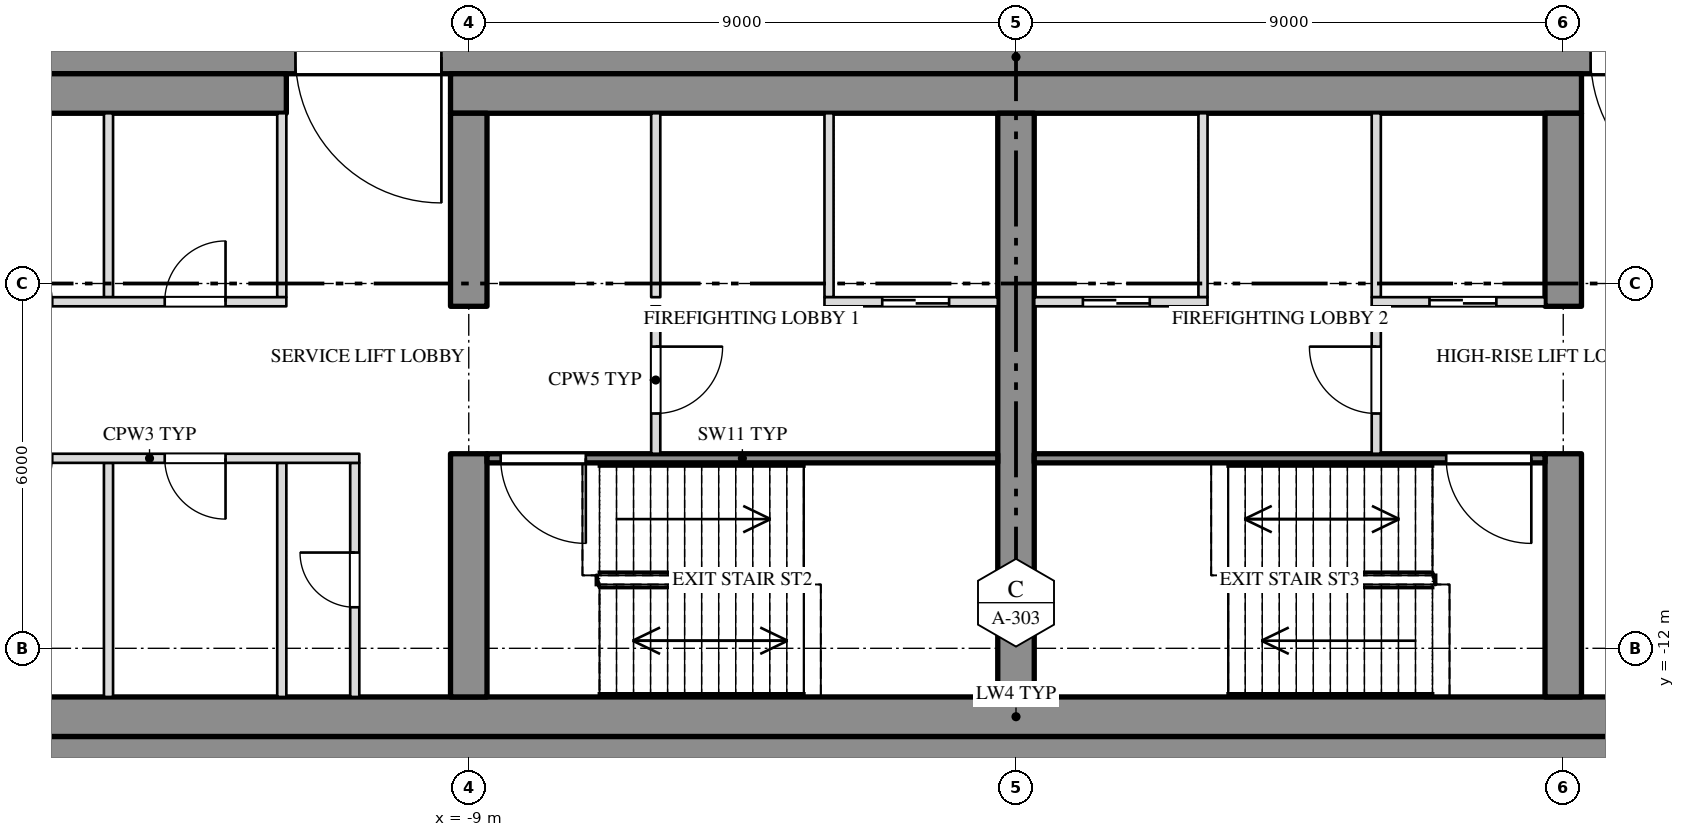
"""IFC4 building model, lengths in metres.
Left out: names, types, materials, properties, quantities, classifications, styles, units other than length and angle.
Written with IfcOpenShell. Run it as: python <this file> out.ifc"""

import sys

from ifc_helpers import new_model, si_unit, direction, frame, frame_2d, origin, place, context, subcontext, project, spatial, rectangle, extrude, element, fill, save


model = new_model("IFC4")
c1 = context("Model", 3, precision=1e-05, world=origin(), true_north=direction((0.0, 1.0)))
c2 = subcontext(c1, "Body", "Model", "MODEL_VIEW")
j1 = project(units=[si_unit("LENGTHUNIT", "METRE"), si_unit("PLANEANGLEUNIT", "RADIAN")], contexts=[c1])
p1 = place(None, origin())
s1 = spatial("IfcSite", under=j1, at=p1, CompositionType="ELEMENT")
p2 = place(p1, origin())
s2 = spatial("IfcBuilding", under=s1, at=p2, CompositionType="ELEMENT")
p3 = place(p2, frame((0.0, 0.0, 276.5)))
s3 = spatial("IfcBuildingStorey", under=s2, at=p3, CompositionType="ELEMENT", Elevation=276.5)
p4 = place(p3, frame((-27.0, -2.275, 0.0), z_axis=(0.0, 0.0, 1.0), x_axis=(1.0, 0.0, 0.0)))
e1 = element("IfcWall", 1, at=p4, inside=s3, PredefinedType="SHEAR", context=c2, shape_type="SweptSolid", body=[
    extrude(rectangle(XDim=54.0, YDim=0.55, at=frame_2d((27.0, 0.0))), origin(), (0.0, 0.0, 1.0), 3.78),
])
p5 = place(p4, frame((15.15, 0.0, 0.0)))
e2 = element("IfcOpeningElement", 2, at=p5, cuts=e1, PredefinedType="OPENING", context=c2, shape_type="SweptSolid", body=[
    extrude(rectangle(XDim=2.4, YDim=2.1, at=frame_2d((1.2, 1.05))), frame((0.0, 0.287, 0.0), z_axis=(0.0, -1.0, 0.0), x_axis=(1.0, 0.0, 0.0)), (0.0, 0.0, 1.0), 0.574),
])
p6 = place(p4, frame((36.45, 0.0, 0.0)))
e3 = element("IfcOpeningElement", 3, at=p6, cuts=e1, PredefinedType="OPENING", context=c2, shape_type="SweptSolid", body=[
    extrude(rectangle(XDim=2.4, YDim=2.1, at=frame_2d((1.2, 1.05))), frame((0.0, 0.287, 0.0), z_axis=(0.0, -1.0, 0.0), x_axis=(1.0, 0.0, 0.0)), (0.0, 0.0, 1.0), 0.574),
])
p7 = place(p3, frame((-27.0, -13.725, 0.0), z_axis=(0.0, 0.0, 1.0), x_axis=(1.0, 0.0, 0.0)))
e4 = element("IfcWall", 4, at=p7, inside=s3, PredefinedType="SHEAR", context=c2, shape_type="SweptSolid", body=[
    extrude(rectangle(XDim=54.0, YDim=0.55, at=frame_2d((27.0, 0.0))), origin(), (0.0, 0.0, 1.0), 3.78),
])
p8 = place(p3, frame((-26.45, -2.875, 0.0), z_axis=(0.0, 0.0, 1.0), x_axis=(1.0, 0.0, 0.0)))
e5 = element("IfcWall", 5, at=p8, inside=s3, PredefinedType="SHEAR", context=c2, shape_type="SweptSolid", body=[
    extrude(rectangle(XDim=14.45, YDim=0.65, at=frame_2d((7.225, 0.0))), origin(), (0.0, 0.0, 1.0), 3.78),
])
p9 = place(p3, frame((-9.3, -2.875, 0.0), z_axis=(0.0, 0.0, 1.0), x_axis=(1.0, 0.0, 0.0)))
e6 = element("IfcWall", 6, at=p9, inside=s3, PredefinedType="SHEAR", context=c2, shape_type="SweptSolid", body=[
    extrude(rectangle(XDim=18.6, YDim=0.65, at=frame_2d((9.3, 0.0))), origin(), (0.0, 0.0, 1.0), 3.78),
])
p10 = place(p3, frame((-26.45, -13.125, 0.0), z_axis=(0.0, 0.0, 1.0), x_axis=(1.0, 0.0, 0.0)))
e7 = element("IfcWall", 7, at=p10, inside=s3, PredefinedType="SHEAR", context=c2, shape_type="SweptSolid", body=[
    extrude(rectangle(XDim=52.9, YDim=0.65, at=frame_2d((26.45, 0.0))), origin(), (0.0, 0.0, 1.0), 3.78),
])
p11 = place(p3, frame((-9.0, -12.8, 0.0), z_axis=(0.0, 0.0, 1.0), x_axis=(0.0, 1.0, 0.0)))
e8 = element("IfcWall", 8, at=p11, inside=s3, PredefinedType="SHEAR", context=c2, shape_type="SweptSolid", body=[
    extrude(rectangle(XDim=4.0, YDim=0.6, at=frame_2d((2.0, 0.0))), origin(), (0.0, 0.0, 1.0), 3.78),
])
p12 = place(p3, frame((-9.0, -6.375, 0.0), z_axis=(0.0, 0.0, 1.0), x_axis=(0.0, 1.0, 0.0)))
e9 = element("IfcWall", 9, at=p12, inside=s3, PredefinedType="SHEAR", context=c2, shape_type="SweptSolid", body=[
    extrude(rectangle(XDim=3.175, YDim=0.6, at=frame_2d((1.587, 0.0))), origin(), (0.0, 0.0, 1.0), 3.78),
])
p13 = place(p3, frame((0.0, -12.8, 0.0), z_axis=(0.0, 0.0, 1.0), x_axis=(0.0, 1.0, 0.0)))
e10 = element("IfcWall", 10, at=p13, inside=s3, PredefinedType="SHEAR", context=c2, shape_type="SweptSolid", body=[
    extrude(rectangle(XDim=9.6, YDim=0.6, at=frame_2d((4.8, 0.0))), origin(), (0.0, 0.0, 1.0), 3.78),
])
p14 = place(p3, frame((9.0, -12.8, 0.0), z_axis=(0.0, 0.0, 1.0), x_axis=(0.0, 1.0, 0.0)))
e11 = element("IfcWall", 11, at=p14, inside=s3, PredefinedType="SHEAR", context=c2, shape_type="SweptSolid", body=[
    extrude(rectangle(XDim=4.0, YDim=0.6, at=frame_2d((2.0, 0.0))), origin(), (0.0, 0.0, 1.0), 3.78),
])
p15 = place(p3, frame((9.0, -6.375, 0.0), z_axis=(0.0, 0.0, 1.0), x_axis=(0.0, 1.0, 0.0)))
e12 = element("IfcWall", 12, at=p15, inside=s3, PredefinedType="SHEAR", context=c2, shape_type="SweptSolid", body=[
    extrude(rectangle(XDim=3.175, YDim=0.6, at=frame_2d((1.587, 0.0))), origin(), (0.0, 0.0, 1.0), 3.78),
])
for number, where, z_axis, x_axis in (
    (13, (-12.075, -6.225, 0.0), (0.0, 0.0, 1.0), (0.0, 1.0, 0.0)),
    (14, (-14.925, -6.225, 0.0), (0.0, 0.0, 1.0), (0.0, 1.0, 0.0)),
    (15, (-3.075, -6.225, 0.0), (0.0, 0.0, 1.0), (0.0, 1.0, 0.0)),
    (16, (-5.925, -6.225, 0.0), (0.0, 0.0, 1.0), (0.0, 1.0, 0.0)),
    (17, (3.075, -6.225, 0.0), (0.0, 0.0, 1.0), (0.0, 1.0, 0.0)),
    (18, (5.925, -6.225, 0.0), (0.0, 0.0, 1.0), (0.0, 1.0, 0.0)),
):
    element("IfcWall", number, at=place(p3, frame(where, z_axis=z_axis, x_axis=x_axis)), inside=s3, PredefinedType="PARTITIONING", context=c2, shape_type="SweptSolid", body=[
        extrude(rectangle(XDim=3.025, YDim=0.15, at=frame_2d((1.513, 0.0))), origin(), (0.0, 0.0, 1.0), 3.78),
    ])
p16 = place(p3, frame((-10.875, -12.8, 0.0), z_axis=(0.0, 0.0, 1.0), x_axis=(0.0, 1.0, 0.0)))
e19 = element("IfcWall", 19, at=p16, inside=s3, PredefinedType="PARTITIONING", context=c2, shape_type="SweptSolid", body=[
    extrude(rectangle(XDim=3.85, YDim=0.15, at=frame_2d((1.925, 0.0))), origin(), (0.0, 0.0, 1.0), 3.78),
])
p17 = place(p16, frame((1.475, 0.0, 0.0)))
e20 = element("IfcOpeningElement", 20, at=p17, cuts=e19, PredefinedType="OPENING", context=c2, shape_type="SweptSolid", body=[
    extrude(rectangle(XDim=0.9, YDim=2.1, at=frame_2d((0.45, 1.05))), frame((0.0, 0.087, 0.0), z_axis=(0.0, -1.0, 0.0), x_axis=(1.0, 0.0, 0.0)), (0.0, 0.0, 1.0), 0.174),
])
for number, where, z_axis, x_axis in (
    (21, (-12.075, -12.8, 0.0), (0.0, 0.0, 1.0), (0.0, 1.0, 0.0)),
    (22, (-14.925, -12.8, 0.0), (0.0, 0.0, 1.0), (0.0, 1.0, 0.0)),
):
    element("IfcWall", number, at=place(p3, frame(where, z_axis=z_axis, x_axis=x_axis)), inside=s3, PredefinedType="PARTITIONING", context=c2, shape_type="SweptSolid", body=[
        extrude(rectangle(XDim=3.85, YDim=0.15, at=frame_2d((1.925, 0.0))), origin(), (0.0, 0.0, 1.0), 3.78),
    ])
p18 = place(p3, frame((-5.925, -8.8, 0.0), z_axis=(0.0, 0.0, 1.0), x_axis=(0.0, 1.0, 0.0)))
e23 = element("IfcWall", 23, at=p18, inside=s3, PredefinedType="PARTITIONING", context=c2, shape_type="SweptSolid", body=[
    extrude(rectangle(XDim=2.425, YDim=0.15, at=frame_2d((1.212, 0.0))), origin(), (0.0, 0.0, 1.0), 3.78),
])
p19 = place(p18, frame((0.662, 0.0, 0.0)))
e24 = element("IfcOpeningElement", 24, at=p19, cuts=e23, PredefinedType="OPENING", context=c2, shape_type="SweptSolid", body=[
    extrude(rectangle(XDim=1.1, YDim=2.1, at=frame_2d((0.55, 1.05))), frame((0.0, 0.087, 0.0), z_axis=(0.0, -1.0, 0.0), x_axis=(1.0, 0.0, 0.0)), (0.0, 0.0, 1.0), 0.174),
])
p20 = place(p3, frame((5.925, -8.8, 0.0), z_axis=(0.0, 0.0, 1.0), x_axis=(0.0, 1.0, 0.0)))
e25 = element("IfcWall", 25, at=p20, inside=s3, PredefinedType="PARTITIONING", context=c2, shape_type="SweptSolid", body=[
    extrude(rectangle(XDim=2.425, YDim=0.15, at=frame_2d((1.212, 0.0))), origin(), (0.0, 0.0, 1.0), 3.78),
])
p21 = place(p20, frame((0.662, 0.0, 0.0)))
e26 = element("IfcOpeningElement", 26, at=p21, cuts=e25, PredefinedType="OPENING", context=c2, shape_type="SweptSolid", body=[
    extrude(rectangle(XDim=1.1, YDim=2.1, at=frame_2d((0.55, 1.05))), frame((0.0, 0.087, 0.0), z_axis=(0.0, -1.0, 0.0), x_axis=(1.0, 0.0, 0.0)), (0.0, 0.0, 1.0), 0.174),
])
p22 = place(p3, frame((-17.7, -6.3, 0.0), z_axis=(0.0, 0.0, 1.0), x_axis=(1.0, 0.0, 0.0)))
e27 = element("IfcWall", 27, at=p22, inside=s3, PredefinedType="PARTITIONING", context=c2, shape_type="SweptSolid", body=[
    extrude(rectangle(XDim=5.7, YDim=0.15, at=frame_2d((2.85, 0.0))), origin(), (0.0, 0.0, 1.0), 3.78),
])
p23 = place(p22, frame((0.85, 0.0, 0.0)))
e28 = element("IfcOpeningElement", 28, at=p23, cuts=e27, PredefinedType="OPENING", context=c2, shape_type="SweptSolid", body=[
    extrude(rectangle(XDim=1.0, YDim=2.1, at=frame_2d((0.5, 1.05))), frame((0.0, 0.087, 0.0), z_axis=(0.0, -1.0, 0.0), x_axis=(1.0, 0.0, 0.0)), (0.0, 0.0, 1.0), 0.174),
])
p24 = place(p22, frame((3.7, 0.0, 0.0)))
e29 = element("IfcOpeningElement", 29, at=p24, cuts=e27, PredefinedType="OPENING", context=c2, shape_type="SweptSolid", body=[
    extrude(rectangle(XDim=1.0, YDim=2.1, at=frame_2d((0.5, 1.05))), frame((0.0, 0.087, 0.0), z_axis=(0.0, -1.0, 0.0), x_axis=(1.0, 0.0, 0.0)), (0.0, 0.0, 1.0), 0.174),
])
p25 = place(p3, frame((-3.15, -6.3, 0.0), z_axis=(0.0, 0.0, 1.0), x_axis=(1.0, 0.0, 0.0)))
e30 = element("IfcWall", 30, at=p25, inside=s3, PredefinedType="PARTITIONING", context=c2, shape_type="SweptSolid", body=[
    extrude(rectangle(XDim=2.85, YDim=0.15, at=frame_2d((1.425, 0.0))), origin(), (0.0, 0.0, 1.0), 3.78),
])
p26 = place(p25, frame((0.95, 0.0, 0.0)))
e31 = element("IfcOpeningElement", 31, at=p26, cuts=e30, PredefinedType="OPENING", context=c2, shape_type="SweptSolid", body=[
    extrude(rectangle(XDim=1.1, YDim=2.1, at=frame_2d((0.55, 1.05))), frame((0.0, 0.087, 0.0), z_axis=(0.0, -1.0, 0.0), x_axis=(1.0, 0.0, 0.0)), (0.0, 0.0, 1.0), 0.174),
])
p27 = place(p3, frame((0.3, -6.3, 0.0), z_axis=(0.0, 0.0, 1.0), x_axis=(1.0, 0.0, 0.0)))
e32 = element("IfcWall", 32, at=p27, inside=s3, PredefinedType="PARTITIONING", context=c2, shape_type="SweptSolid", body=[
    extrude(rectangle(XDim=2.85, YDim=0.15, at=frame_2d((1.425, 0.0))), origin(), (0.0, 0.0, 1.0), 3.78),
])
p28 = place(p27, frame((0.8, 0.0, 0.0)))
e33 = element("IfcOpeningElement", 33, at=p28, cuts=e32, PredefinedType="OPENING", context=c2, shape_type="SweptSolid", body=[
    extrude(rectangle(XDim=1.1, YDim=2.1, at=frame_2d((0.55, 1.05))), frame((0.0, 0.087, 0.0), z_axis=(0.0, -1.0, 0.0), x_axis=(1.0, 0.0, 0.0)), (0.0, 0.0, 1.0), 0.174),
])
p29 = place(p3, frame((5.85, -6.3, 0.0), z_axis=(0.0, 0.0, 1.0), x_axis=(1.0, 0.0, 0.0)))
e34 = element("IfcWall", 34, at=p29, inside=s3, PredefinedType="PARTITIONING", context=c2, shape_type="SweptSolid", body=[
    extrude(rectangle(XDim=2.85, YDim=0.15, at=frame_2d((1.425, 0.0))), origin(), (0.0, 0.0, 1.0), 3.78),
])
p30 = place(p29, frame((0.95, 0.0, 0.0)))
e35 = element("IfcOpeningElement", 35, at=p30, cuts=e34, PredefinedType="OPENING", context=c2, shape_type="SweptSolid", body=[
    extrude(rectangle(XDim=1.1, YDim=2.1, at=frame_2d((0.55, 1.05))), frame((0.0, 0.087, 0.0), z_axis=(0.0, -1.0, 0.0), x_axis=(1.0, 0.0, 0.0)), (0.0, 0.0, 1.0), 0.174),
])
p31 = place(p3, frame((-17.7, -8.875, 0.0), z_axis=(0.0, 0.0, 1.0), x_axis=(1.0, 0.0, 0.0)))
e36 = element("IfcWall", 36, at=p31, inside=s3, PredefinedType="PARTITIONING", context=c2, shape_type="SweptSolid", body=[
    extrude(rectangle(XDim=6.9, YDim=0.15, at=frame_2d((3.45, 0.0))), origin(), (0.0, 0.0, 1.0), 3.78),
])
p32 = place(p31, frame((0.85, 0.0, 0.0)))
e37 = element("IfcOpeningElement", 37, at=p32, cuts=e36, PredefinedType="OPENING", context=c2, shape_type="SweptSolid", body=[
    extrude(rectangle(XDim=1.0, YDim=2.1, at=frame_2d((0.5, 1.05))), frame((0.0, 0.087, 0.0), z_axis=(0.0, -1.0, 0.0), x_axis=(1.0, 0.0, 0.0)), (0.0, 0.0, 1.0), 0.174),
])
p33 = place(p31, frame((3.7, 0.0, 0.0)))
e38 = element("IfcOpeningElement", 38, at=p33, cuts=e36, PredefinedType="OPENING", context=c2, shape_type="SweptSolid", body=[
    extrude(rectangle(XDim=1.0, YDim=2.1, at=frame_2d((0.5, 1.05))), frame((0.0, 0.087, 0.0), z_axis=(0.0, -1.0, 0.0), x_axis=(1.0, 0.0, 0.0)), (0.0, 0.0, 1.0), 0.174),
])
p34 = place(p3, frame((-8.7, -8.875, 0.0), z_axis=(0.0, 0.0, 1.0), x_axis=(1.0, 0.0, 0.0)))
e39 = element("IfcWall", 39, at=p34, inside=s3, PredefinedType="SHEAR", context=c2, shape_type="SweptSolid", body=[
    extrude(rectangle(XDim=8.4, YDim=0.15, at=frame_2d((4.2, 0.0))), origin(), (0.0, 0.0, 1.0), 3.78),
])
p35 = place(p34, frame((0.225, 0.0, 0.0)))
e40 = element("IfcOpeningElement", 40, at=p35, cuts=e39, PredefinedType="OPENING", context=c2, shape_type="SweptSolid", body=[
    extrude(rectangle(XDim=1.4, YDim=2.1, at=frame_2d((0.7, 1.05))), frame((0.0, 0.087, 0.0), z_axis=(0.0, -1.0, 0.0), x_axis=(1.0, 0.0, 0.0)), (0.0, 0.0, 1.0), 0.174),
])
p36 = place(p3, frame((0.3, -8.875, 0.0), z_axis=(0.0, 0.0, 1.0), x_axis=(1.0, 0.0, 0.0)))
e41 = element("IfcWall", 41, at=p36, inside=s3, PredefinedType="SHEAR", context=c2, shape_type="SweptSolid", body=[
    extrude(rectangle(XDim=8.4, YDim=0.15, at=frame_2d((4.2, 0.0))), origin(), (0.0, 0.0, 1.0), 3.78),
])
p37 = place(p36, frame((6.775, 0.0, 0.0)))
e42 = element("IfcOpeningElement", 42, at=p37, cuts=e41, PredefinedType="OPENING", context=c2, shape_type="SweptSolid", body=[
    extrude(rectangle(XDim=1.4, YDim=2.1, at=frame_2d((0.7, 1.05))), frame((0.0, 0.087, 0.0), z_axis=(0.0, -1.0, 0.0), x_axis=(1.0, 0.0, 0.0)), (0.0, 0.0, 1.0), 0.174),
])
p38 = place(p32, origin())
e43 = element("IfcDoor", 43, at=p38, inside=s3, OperationType="SINGLE_SWING_RIGHT", PredefinedType="DOOR", context=c2, shape_type="SweptSolid", body=[
    extrude(rectangle(XDim=1.0, YDim=2.1, at=frame_2d((0.5, 1.05))), frame((0.0, 0.025, 0.0), z_axis=(0.0, -1.0, 0.0), x_axis=(1.0, 0.0, 0.0)), (0.0, 0.0, 1.0), 0.05),
])
fill(e37, e43)
p39 = place(p23, origin())
e44 = element("IfcDoor", 44, at=p39, inside=s3, OperationType="SINGLE_SWING_LEFT", PredefinedType="DOOR", context=c2, shape_type="SweptSolid", body=[
    extrude(rectangle(XDim=1.0, YDim=2.1, at=frame_2d((0.5, 1.05))), frame((0.0, 0.025, 0.0), z_axis=(0.0, -1.0, 0.0), x_axis=(1.0, 0.0, 0.0)), (0.0, 0.0, 1.0), 0.05),
])
fill(e28, e44)
p40 = place(p33, origin())
e45 = element("IfcDoor", 45, at=p40, inside=s3, OperationType="SINGLE_SWING_LEFT", PredefinedType="DOOR", context=c2, shape_type="SweptSolid", body=[
    extrude(rectangle(XDim=1.0, YDim=2.1, at=frame_2d((0.5, 1.05))), frame((0.0, 0.025, 0.0), z_axis=(0.0, -1.0, 0.0), x_axis=(1.0, 0.0, 0.0)), (0.0, 0.0, 1.0), 0.05),
])
fill(e38, e45)
p41 = place(p24, origin())
e46 = element("IfcDoor", 46, at=p41, inside=s3, OperationType="SINGLE_SWING_RIGHT", PredefinedType="DOOR", context=c2, shape_type="SweptSolid", body=[
    extrude(rectangle(XDim=1.0, YDim=2.1, at=frame_2d((0.5, 1.05))), frame((0.0, 0.025, 0.0), z_axis=(0.0, -1.0, 0.0), x_axis=(1.0, 0.0, 0.0)), (0.0, 0.0, 1.0), 0.05),
])
fill(e29, e46)
p42 = place(p17, origin())
e47 = element("IfcDoor", 47, at=p42, inside=s3, OperationType="SINGLE_SWING_RIGHT", PredefinedType="DOOR", context=c2, shape_type="SweptSolid", body=[
    extrude(rectangle(XDim=0.9, YDim=2.1, at=frame_2d((0.45, 1.05))), frame((0.0, 0.025, 0.0), z_axis=(0.0, -1.0, 0.0), x_axis=(1.0, 0.0, 0.0)), (0.0, 0.0, 1.0), 0.05),
])
fill(e20, e47)
p43 = place(p5, origin())
e48 = element("IfcDoor", 48, at=p43, inside=s3, OperationType="DOUBLE_DOOR_SINGLE_SWING", PredefinedType="DOOR", context=c2, shape_type="SweptSolid", body=[
    extrude(rectangle(XDim=2.4, YDim=2.1, at=frame_2d((1.2, 1.05))), frame((0.0, 0.025, 0.0), z_axis=(0.0, -1.0, 0.0), x_axis=(1.0, 0.0, 0.0)), (0.0, 0.0, 1.0), 0.05),
])
fill(e2, e48)
p44 = place(p35, origin())
e49 = element("IfcDoor", 49, at=p44, inside=s3, OperationType="DOUBLE_DOOR_SINGLE_SWING", PredefinedType="DOOR", context=c2, shape_type="SweptSolid", body=[
    extrude(rectangle(XDim=1.4, YDim=2.1, at=frame_2d((0.7, 1.05))), frame((0.0, 0.025, 0.0), z_axis=(0.0, -1.0, 0.0), x_axis=(1.0, 0.0, 0.0)), (0.0, 0.0, 1.0), 0.05),
])
fill(e40, e49)
p45 = place(p19, origin())
e50 = element("IfcDoor", 50, at=p45, inside=s3, OperationType="SINGLE_SWING_LEFT", PredefinedType="DOOR", context=c2, shape_type="SweptSolid", body=[
    extrude(rectangle(XDim=1.1, YDim=2.1, at=frame_2d((0.55, 1.05))), frame((0.0, 0.025, 0.0), z_axis=(0.0, -1.0, 0.0), x_axis=(1.0, 0.0, 0.0)), (0.0, 0.0, 1.0), 0.05),
])
fill(e24, e50)
p46 = place(p26, origin())
e51 = element("IfcDoor", 51, at=p46, inside=s3, OperationType="SLIDING_TO_LEFT", PredefinedType="DOOR", context=c2, shape_type="SweptSolid", body=[
    extrude(rectangle(XDim=1.1, YDim=2.1, at=frame_2d((0.55, 1.05))), frame((0.0, 0.025, 0.0), z_axis=(0.0, -1.0, 0.0), x_axis=(1.0, 0.0, 0.0)), (0.0, 0.0, 1.0), 0.05),
])
fill(e31, e51)
p47 = place(p28, origin())
e52 = element("IfcDoor", 52, at=p47, inside=s3, OperationType="SLIDING_TO_RIGHT", PredefinedType="DOOR", context=c2, shape_type="SweptSolid", body=[
    extrude(rectangle(XDim=1.1, YDim=2.1, at=frame_2d((0.55, 1.05))), frame((0.0, 0.025, 0.0), z_axis=(0.0, -1.0, 0.0), x_axis=(1.0, 0.0, 0.0)), (0.0, 0.0, 1.0), 0.05),
])
fill(e33, e52)
p48 = place(p21, origin())
e53 = element("IfcDoor", 53, at=p48, inside=s3, OperationType="SINGLE_SWING_RIGHT", PredefinedType="DOOR", context=c2, shape_type="SweptSolid", body=[
    extrude(rectangle(XDim=1.1, YDim=2.1, at=frame_2d((0.55, 1.05))), frame((0.0, 0.025, 0.0), z_axis=(0.0, -1.0, 0.0), x_axis=(1.0, 0.0, 0.0)), (0.0, 0.0, 1.0), 0.05),
])
fill(e26, e53)
p49 = place(p30, origin())
e54 = element("IfcDoor", 54, at=p49, inside=s3, OperationType="SLIDING_TO_RIGHT", PredefinedType="DOOR", context=c2, shape_type="SweptSolid", body=[
    extrude(rectangle(XDim=1.1, YDim=2.1, at=frame_2d((0.55, 1.05))), frame((0.0, 0.025, 0.0), z_axis=(0.0, -1.0, 0.0), x_axis=(1.0, 0.0, 0.0)), (0.0, 0.0, 1.0), 0.05),
])
fill(e35, e54)
p50 = place(p37, origin())
e55 = element("IfcDoor", 55, at=p50, inside=s3, OperationType="DOUBLE_DOOR_SINGLE_SWING", PredefinedType="DOOR", context=c2, shape_type="SweptSolid", body=[
    extrude(rectangle(XDim=1.4, YDim=2.1, at=frame_2d((0.7, 1.05))), frame((0.0, 0.025, 0.0), z_axis=(0.0, -1.0, 0.0), x_axis=(1.0, 0.0, 0.0)), (0.0, 0.0, 1.0), 0.05),
])
fill(e42, e55)
p51 = place(p6, origin())
e56 = element("IfcDoor", 56, at=p51, inside=s3, OperationType="DOUBLE_DOOR_SINGLE_SWING", PredefinedType="DOOR", context=c2, shape_type="SweptSolid", body=[
    extrude(rectangle(XDim=2.4, YDim=2.1, at=frame_2d((1.2, 1.05))), frame((0.0, 0.025, 0.0), z_axis=(0.0, -1.0, 0.0), x_axis=(1.0, 0.0, 0.0)), (0.0, 0.0, 1.0), 0.05),
])
fill(e3, e56)
save(model, sys.argv[1])
